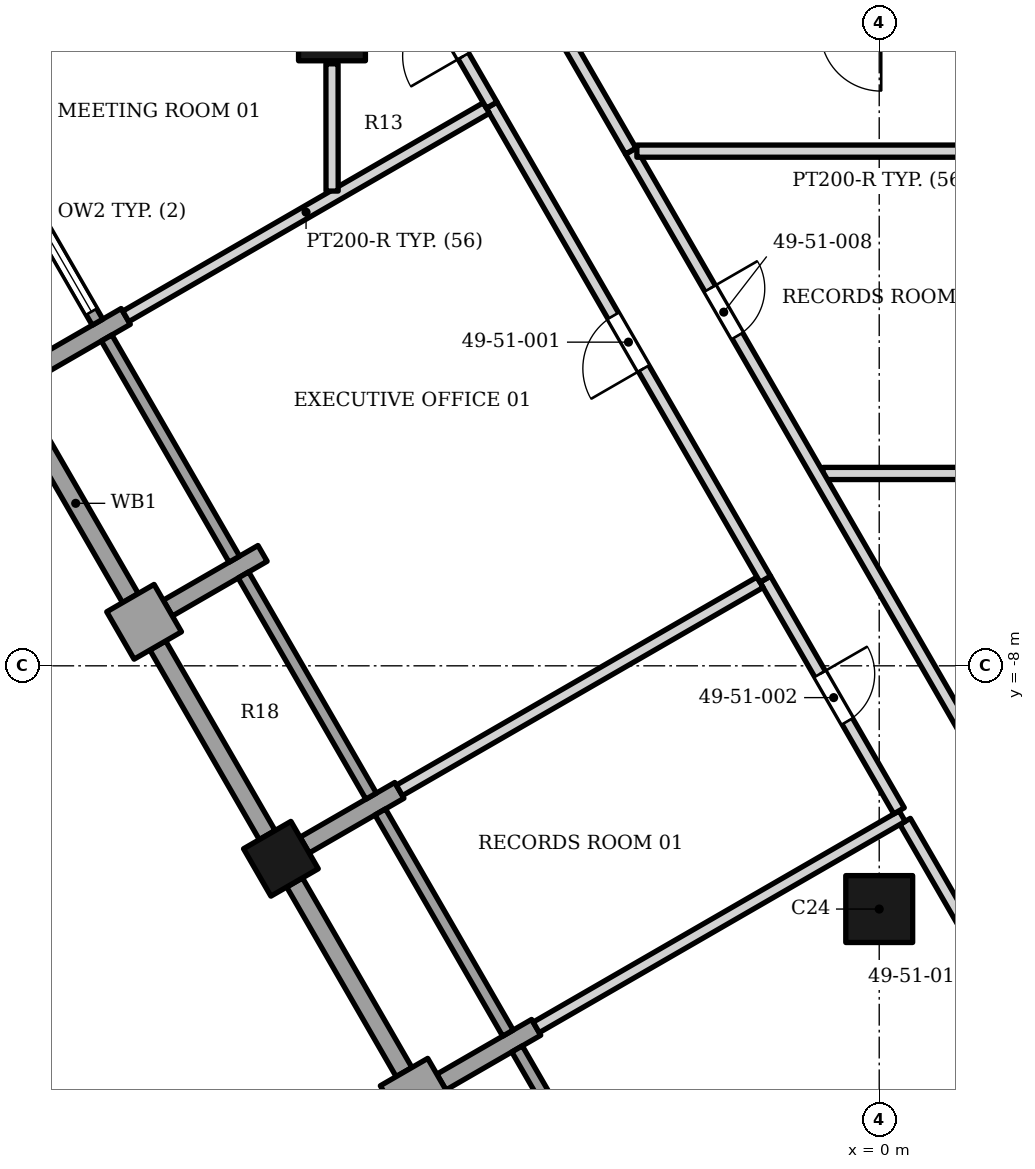
"""IFC4 building model, lengths in metres.
Left out: names, types, materials, properties, quantities, classifications, styles, units other than length and angle.
Written with IfcOpenShell. Run it as: python <this file> out.ifc"""

import sys

from ifc_helpers import new_model, si_unit, direction, frame, frame_2d, origin, origin_2d, place, context, subcontext, project, spatial, rectangle, extrude, element, fill, save


model = new_model("IFC4")
c1 = context("Model", 3, precision=1e-05, world=origin(), true_north=direction((0.0, 1.0)))
c2 = subcontext(c1, "Body", "Model", "MODEL_VIEW")
j1 = project(units=[si_unit("LENGTHUNIT", "METRE"), si_unit("PLANEANGLEUNIT", "RADIAN")], contexts=[c1])
p1 = place(None, origin())
s1 = spatial("IfcSite", under=j1, at=p1, CompositionType="ELEMENT")
p2 = place(p1, origin())
s2 = spatial("IfcBuilding", under=s1, at=p2, CompositionType="ELEMENT")
p3 = place(p2, frame((0.0, 0.0, 208.1)))
s3 = spatial("IfcBuildingStorey", under=s2, at=p3, CompositionType="ELEMENT", Elevation=208.1)
for number, where, z_axis, x_axis in (
    (1, (-9.0, 2.5, 0.0), (0.0, 0.0, 1.0), (1.0, 0.0, 0.0)),
    (2, (0.0, -12.0, 0.0), (0.0, 0.0, 1.0), (1.0, 0.0, 0.0)),
):
    element("IfcColumn", number, at=place(p3, frame(where, z_axis=z_axis, x_axis=x_axis)), inside=s3, PredefinedType="COLUMN", context=c2, shape_type="SweptSolid", body=[
        extrude(rectangle(XDim=1.1, YDim=1.1, at=origin_2d()), origin(), (0.0, 0.0, 1.0), 3.9),
    ])
p4 = place(p3, frame((-9.84, -11.173, 0.0), z_axis=(0.0, 0.0, 1.0), x_axis=(0.499999984885, -0.866025412511, 0.0)))
e3 = element("IfcColumn", 3, at=p4, inside=s3, PredefinedType="COLUMN", context=c2, shape_type="SweptSolid", body=[
    extrude(rectangle(XDim=0.9, YDim=0.9, at=origin_2d()), origin(), (0.0, 0.0, 1.0), 3.9),
])
p5 = place(p3, frame((-12.392, -2.254, 0.0), z_axis=(0.0, 0.0, 1.0), x_axis=(-0.865955154139, -0.50012165622, 0.0)))
e4 = element("IfcWall", 4, at=p5, inside=s3, PredefinedType="SOLIDWALL", context=c2, shape_type="SweptSolid", body=[
    extrude(rectangle(XDim=1.8, YDim=0.3, at=frame_2d((0.9, 0.0))), origin(), (0.0, 0.0, 1.0), 3.0),
])
p6 = place(p3, frame((-12.48, -7.501, 0.0), z_axis=(0.0, 0.0, 1.0), x_axis=(0.865896406789, 0.500223362819, 0.0)))
e5 = element("IfcWall", 5, at=p6, inside=s3, PredefinedType="SOLIDWALL", context=c2, shape_type="SweptSolid", body=[
    extrude(rectangle(XDim=0.9, YDim=0.9, at=frame_2d((0.45, 0.0))), origin(), (0.0, 0.0, 1.0), 3.0),
])
p7 = place(p3, frame((-10.142, -6.151, 0.0), z_axis=(0.0, 0.0, 1.0), x_axis=(-0.866047807691, -0.499961193289, 0.0)))
e6 = element("IfcWall", 6, at=p7, inside=s3, PredefinedType="SOLIDWALL", context=c2, shape_type="SweptSolid", body=[
    extrude(rectangle(XDim=1.8, YDim=0.3, at=frame_2d((0.9, 0.0))), origin(), (0.0, 0.0, 1.0), 3.0),
])
p8 = place(p3, frame((-7.892, -10.048, 0.0), z_axis=(0.0, 0.0, 1.0), x_axis=(-0.866013897511, -0.50001992892, 0.0)))
e7 = element("IfcWall", 7, at=p8, inside=s3, PredefinedType="SOLIDWALL", context=c2, shape_type="SweptSolid", body=[
    extrude(rectangle(XDim=1.8, YDim=0.3, at=frame_2d((0.9, 0.0))), origin(), (0.0, 0.0, 1.0), 3.0),
])
p9 = place(p3, frame((-7.98, -15.295, 0.0), z_axis=(0.0, 0.0, 1.0), x_axis=(0.866013897511, 0.50001992892, 0.0)))
e8 = element("IfcWall", 8, at=p9, inside=s3, PredefinedType="SOLIDWALL", context=c2, shape_type="SweptSolid", body=[
    extrude(rectangle(XDim=0.9, YDim=0.9, at=frame_2d((0.45, 0.0))), origin(), (0.0, 0.0, 1.0), 3.0),
])
p10 = place(p3, frame((-7.2, -14.845, 0.0), z_axis=(0.0, 0.0, 1.0), x_axis=(0.865989075817, 0.500062916607, 0.0)))
e9 = element("IfcWall", 9, at=p10, inside=s3, PredefinedType="SOLIDWALL", context=c2, shape_type="SweptSolid", body=[
    extrude(rectangle(XDim=1.8, YDim=0.3, at=frame_2d((0.9, 0.0))), origin(), (0.0, 0.0, 1.0), 3.0),
])
p11 = place(p3, frame((-14.956, 1.288, 0.0), z_axis=(0.0, 0.0, 1.0), x_axis=(0.500027713859, -0.866009402589, 0.0)))
e10 = element("IfcWall", 10, at=p11, inside=s3, PredefinedType="ELEMENTEDWALL", context=c2, shape_type="SweptSolid", body=[
    extrude(rectangle(XDim=4.2, YDim=0.2, at=frame_2d((2.1, 0.0))), origin(), (0.0, 0.0, 1.0), 3.0),
])
p12 = place(p11, frame((0.2, 0.0, 0.45)))
e11 = element("IfcOpeningElement", 11, at=p12, cuts=e10, PredefinedType="OPENING", context=c2, shape_type="SweptSolid", body=[
    extrude(rectangle(XDim=3.8, YDim=2.25, at=frame_2d((1.9, 1.125))), frame((0.0, 0.11, 0.0), z_axis=(0.0, -1.0, 0.0), x_axis=(1.0, 0.0, 0.0)), (0.0, 0.0, 1.0), 0.22),
])
p13 = place(p3, frame((-14.115, -3.769, 0.0), z_axis=(0.0, 0.0, 1.0), x_axis=(0.500012057535, -0.866018442252, 0.0)))
e12 = element("IfcWall", 12, at=p13, inside=s3, PredefinedType="SOLIDWALL", context=c2, shape_type="SweptSolid", body=[
    extrude(rectangle(XDim=3.6, YDim=0.3, at=frame_2d((1.8, 0.0))), origin(), (0.0, 0.0, 1.0), 3.0),
])
p14 = place(p3, frame((-12.706, -2.609, 0.0), z_axis=(0.0, 0.0, 1.0), x_axis=(0.500002543286, -0.866023935413, 0.0)))
e13 = element("IfcWall", 13, at=p14, inside=s3, PredefinedType="ELEMENTEDWALL", context=c2, shape_type="SweptSolid", body=[
    extrude(rectangle(XDim=4.2, YDim=0.2, at=frame_2d((2.1, 0.0))), origin(), (0.0, 0.0, 1.0), 3.0),
])
p15 = place(p3, frame((-11.865, -7.666, 0.0), z_axis=(0.0, 0.0, 1.0), x_axis=(0.500012057535, -0.866018442252, 0.0)))
e14 = element("IfcWall", 14, at=p15, inside=s3, PredefinedType="SOLIDWALL", context=c2, shape_type="SweptSolid", body=[
    extrude(rectangle(XDim=3.6, YDim=0.3, at=frame_2d((1.8, 0.0))), origin(), (0.0, 0.0, 1.0), 3.0),
])
p16 = place(p3, frame((-10.456, -6.506, 0.0), z_axis=(0.0, 0.0, 1.0), x_axis=(0.500027713859, -0.866009402589, 0.0)))
e15 = element("IfcWall", 15, at=p16, inside=s3, PredefinedType="ELEMENTEDWALL", context=c2, shape_type="SweptSolid", body=[
    extrude(rectangle(XDim=4.2, YDim=0.2, at=frame_2d((2.1, 0.0))), origin(), (0.0, 0.0, 1.0), 3.0),
])
p17 = place(p3, frame((-9.615, -11.563, 0.0), z_axis=(0.0, 0.0, 1.0), x_axis=(0.500012057535, -0.866018442252, 0.0)))
e16 = element("IfcWall", 16, at=p17, inside=s3, PredefinedType="SOLIDWALL", context=c2, shape_type="SweptSolid", body=[
    extrude(rectangle(XDim=3.6, YDim=0.3, at=frame_2d((1.8, 0.0))), origin(), (0.0, 0.0, 1.0), 2.95),
])
p18 = place(p3, frame((-8.206, -10.403, 0.0), z_axis=(0.0, 0.0, 1.0), x_axis=(0.500002543286, -0.866023935413, 0.0)))
e17 = element("IfcWall", 17, at=p18, inside=s3, PredefinedType="ELEMENTEDWALL", context=c2, shape_type="SweptSolid", body=[
    extrude(rectangle(XDim=4.2, YDim=0.2, at=frame_2d((2.1, 0.0))), origin(), (0.0, 0.0, 1.0), 2.95),
])
p19 = place(p3, frame((-5.956, -14.3, 0.0), z_axis=(0.0, 0.0, 1.0), x_axis=(0.500027713859, -0.866009402589, 0.0)))
e18 = element("IfcWall", 18, at=p19, inside=s3, PredefinedType="ELEMENTEDWALL", context=c2, shape_type="SweptSolid", body=[
    extrude(rectangle(XDim=4.2, YDim=0.2, at=frame_2d((2.1, 0.0))), origin(), (0.0, 0.0, 1.0), 3.0),
])
p20 = place(p3, frame((0.426, -10.558, 0.0), z_axis=(0.0, 0.0, 1.0), x_axis=(0.500350308999, -0.865823058301, 0.0)))
e19 = element("IfcWall", 19, at=p20, inside=s3, PredefinedType="PARTITIONING", context=c2, shape_type="SweptSolid", body=[
    extrude(rectangle(XDim=4.083, YDim=0.2, at=frame_2d((2.042, 0.0))), origin(), (0.0, 0.0, 1.0), 2.95),
])
p21 = place(p20, frame((1.842, 0.0, 0.0)))
e20 = element("IfcOpeningElement", 20, at=p21, cuts=e19, PredefinedType="OPENING", context=c2, shape_type="SweptSolid", body=[
    extrude(rectangle(XDim=1.1, YDim=2.1, at=frame_2d((0.55, 1.05))), frame((0.0, 0.11, 0.0), z_axis=(0.0, -1.0, 0.0), x_axis=(1.0, 0.0, 0.0)), (0.0, 0.0, 1.0), 0.22),
])
p22 = place(p3, frame((-5.641, -13.946, 0.0), z_axis=(0.0, 0.0, 1.0), x_axis=(0.866131772529, 0.499815718657, 0.0)))
e21 = element("IfcWall", 21, at=p22, inside=s3, PredefinedType="PARTITIONING", context=c2, shape_type="SweptSolid", body=[
    extrude(rectangle(XDim=6.949, YDim=0.2, at=frame_2d((3.475, 0.0))), origin(), (0.0, 0.0, 1.0), 2.884),
])
p23 = place(p3, frame((-1.873, -6.576, 0.0), z_axis=(0.0, 0.0, 1.0), x_axis=(0.499989943423, -0.866031209874, 0.0)))
e22 = element("IfcWall", 22, at=p23, inside=s3, PredefinedType="PARTITIONING", context=c2, shape_type="SweptSolid", body=[
    extrude(rectangle(XDim=4.398, YDim=0.2, at=frame_2d((2.199, 0.0))), origin(), (0.0, 0.0, 1.0), 2.884),
])
p24 = place(p23, frame((1.798, 0.0, 0.0)))
e23 = element("IfcOpeningElement", 23, at=p24, cuts=e22, PredefinedType="OPENING", context=c2, shape_type="SweptSolid", body=[
    extrude(rectangle(XDim=0.9, YDim=2.1, at=frame_2d((0.45, 1.05))), frame((0.0, 0.11, 0.0), z_axis=(0.0, -1.0, 0.0), x_axis=(1.0, 0.0, 0.0)), (0.0, 0.0, 1.0), 0.22),
])
p25 = place(p3, frame((-7.891, -10.048, 0.0), z_axis=(0.0, 0.0, 1.0), x_axis=(0.866160062832, 0.499766691121, 0.0)))
e24 = element("IfcWall", 24, at=p25, inside=s3, PredefinedType="PARTITIONING", context=c2, shape_type="SweptSolid", body=[
    extrude(rectangle(XDim=6.848, YDim=0.2, at=frame_2d((3.424, 0.0))), origin(), (0.0, 0.0, 1.0), 2.884),
])
p26 = place(p3, frame((-6.374, 1.22, 0.0), z_axis=(0.0, 0.0, 1.0), x_axis=(0.5000018851, -0.866024315419, 0.0)))
e25 = element("IfcWall", 25, at=p26, inside=s3, PredefinedType="PARTITIONING", context=c2, shape_type="SweptSolid", body=[
    extrude(rectangle(XDim=9.0, YDim=0.2, at=frame_2d((4.5, 0.0))), origin(), (0.0, 0.0, 1.0), 2.884),
])
p27 = place(p26, frame((4.0, 0.0, 0.0)))
e26 = element("IfcOpeningElement", 26, at=p27, cuts=e25, PredefinedType="OPENING", context=c2, shape_type="SweptSolid", body=[
    extrude(rectangle(XDim=1.0, YDim=2.4, at=frame_2d((0.5, 1.2))), frame((0.0, 0.11, 0.0), z_axis=(0.0, -1.0, 0.0), x_axis=(1.0, 0.0, 0.0)), (0.0, 0.0, 1.0), 0.22),
])
p28 = place(p3, frame((-0.925, -4.837, 0.0), z_axis=(0.0, 0.0, 1.0), x_axis=(0.999999933905, 0.000363579678, 0.0)))
e27 = element("IfcWall", 27, at=p28, inside=s3, PredefinedType="PARTITIONING", context=c2, shape_type="SweptSolid", body=[
    extrude(rectangle(XDim=4.7, YDim=0.2, at=frame_2d((2.35, 0.0))), origin(), (0.0, 0.0, 1.0), 3.73),
])
p29 = place(p3, frame((-12.392, -2.254, 0.0), z_axis=(0.0, 0.0, 1.0), x_axis=(0.86583110311, 0.50033638773, 0.0)))
e28 = element("IfcWall", 28, at=p29, inside=s3, PredefinedType="PARTITIONING", context=c2, shape_type="SweptSolid", body=[
    extrude(rectangle(XDim=6.849, YDim=0.2, at=frame_2d((3.425, 0.0))), origin(), (0.0, 0.0, 1.0), 3.052),
])
p30 = place(p3, frame((-4.086, 0.464, 0.0), z_axis=(0.0, 0.0, 1.0), x_axis=(0.499999074482, -0.866025938132, 0.0)))
e29 = element("IfcWall", 29, at=p30, inside=s3, PredefinedType="PARTITIONING", context=c2, shape_type="SweptSolid", body=[
    extrude(rectangle(XDim=13.013, YDim=0.2, at=frame_2d((6.507, 0.0))), origin(), (0.0, 0.0, 1.0), 2.884),
])
p31 = place(p30, frame((2.607, 0.0, 0.0)))
e30 = element("IfcOpeningElement", 30, at=p31, cuts=e29, PredefinedType="OPENING", context=c2, shape_type="SweptSolid", body=[
    extrude(rectangle(XDim=0.9, YDim=2.1, at=frame_2d((0.45, 1.05))), frame((0.0, 0.11, 0.0), z_axis=(0.0, -1.0, 0.0), x_axis=(1.0, 0.0, 0.0)), (0.0, 0.0, 1.0), 0.22),
])
p32 = place(p3, frame((-3.986, 0.464, 0.0), z_axis=(0.0, 0.0, 1.0), x_axis=(1.0, 0.0, 0.0)))
e31 = element("IfcWall", 31, at=p32, inside=s3, PredefinedType="PARTITIONING", context=c2, shape_type="SweptSolid", body=[
    extrude(rectangle(XDim=6.452, YDim=0.2, at=frame_2d((3.226, 0.0))), origin(), (0.0, 0.0, 1.0), 2.884),
])
p33 = place(p3, frame((-7.804, 3.699, 0.0), z_axis=(0.0, 0.0, 1.0), x_axis=(0.500020309772, -0.866013677614, 0.0)))
e32 = element("IfcWall", 32, at=p33, inside=s3, PredefinedType="PARTITIONING", context=c2, shape_type="SweptSolid", body=[
    extrude(rectangle(XDim=2.862, YDim=0.2, at=frame_2d((1.431, 0.0))), origin(), (0.0, 0.0, 1.0), 3.73),
])
p34 = place(p33, frame((0.932, 0.0, 0.0)))
e33 = element("IfcOpeningElement", 33, at=p34, cuts=e32, PredefinedType="OPENING", context=c2, shape_type="SweptSolid", body=[
    extrude(rectangle(XDim=1.0, YDim=2.1, at=frame_2d((0.5, 1.05))), frame((0.0, 0.11, 0.0), z_axis=(0.0, -1.0, 0.0), x_axis=(1.0, 0.0, 0.0)), (0.0, 0.0, 1.0), 0.22),
])
p35 = place(p3, frame((-9.0, 1.9, 0.0), z_axis=(0.0, 0.0, 1.0), x_axis=(0.000816802528, -0.999999666417, 0.0)))
e34 = element("IfcWall", 34, at=p35, inside=s3, PredefinedType="PARTITIONING", context=c2, shape_type="SweptSolid", body=[
    extrude(rectangle(XDim=2.092, YDim=0.2, at=frame_2d((1.046, 0.0))), origin(), (0.0, 0.0, 1.0), 3.052),
])
p36 = place(p3, frame((-5.963, 3.712, 0.0), z_axis=(0.0, 0.0, 1.0), x_axis=(0.500417539209, -0.865784203166, 0.0)))
e35 = element("IfcWall", 35, at=p36, inside=s3, PredefinedType="PARTITIONING", context=c2, shape_type="SweptSolid", body=[
    extrude(rectangle(XDim=3.749, YDim=0.2, at=frame_2d((1.875, 0.0))), origin(), (0.0, 0.0, 1.0), 2.884),
])
p37 = place(p12, origin())
e36 = element("IfcWindow", 36, at=p37, inside=s3, PartitioningType="SINGLE_PANEL", PredefinedType="WINDOW", context=c2, shape_type="SweptSolid", body=[
    extrude(rectangle(XDim=3.8, YDim=2.25, at=frame_2d((1.9, 1.125))), frame((0.0, 0.03, 0.0), z_axis=(0.0, -1.0, 0.0), x_axis=(1.0, 0.0, 0.0)), (0.0, 0.0, 1.0), 0.06),
])
fill(e11, e36)
p38 = place(p27, origin())
e37 = element("IfcDoor", 37, at=p38, inside=s3, OperationType="SINGLE_SWING_RIGHT", PredefinedType="DOOR", context=c2, shape_type="SweptSolid", body=[
    extrude(rectangle(XDim=1.0, YDim=2.4, at=frame_2d((0.5, 1.2))), frame((0.0, 0.025, 0.0), z_axis=(0.0, -1.0, 0.0), x_axis=(1.0, 0.0, 0.0)), (0.0, 0.0, 1.0), 0.05),
])
fill(e26, e37)
p39 = place(p24, origin())
e38 = element("IfcDoor", 38, at=p39, inside=s3, OperationType="SINGLE_SWING_LEFT", PredefinedType="DOOR", context=c2, shape_type="SweptSolid", body=[
    extrude(rectangle(XDim=0.9, YDim=2.1, at=frame_2d((0.45, 1.05))), frame((0.0, 0.025, 0.0), z_axis=(0.0, -1.0, 0.0), x_axis=(1.0, 0.0, 0.0)), (0.0, 0.0, 1.0), 0.05),
])
fill(e23, e38)
p40 = place(p31, origin())
e39 = element("IfcDoor", 39, at=p40, inside=s3, OperationType="SINGLE_SWING_LEFT", PredefinedType="DOOR", context=c2, shape_type="SweptSolid", body=[
    extrude(rectangle(XDim=0.9, YDim=2.1, at=frame_2d((0.45, 1.05))), frame((0.0, 0.025, 0.0), z_axis=(0.0, -1.0, 0.0), x_axis=(1.0, 0.0, 0.0)), (0.0, 0.0, 1.0), 0.05),
])
fill(e30, e39)
p41 = place(p34, origin())
e40 = element("IfcDoor", 40, at=p41, inside=s3, OperationType="SINGLE_SWING_RIGHT", PredefinedType="DOOR", context=c2, shape_type="SweptSolid", body=[
    extrude(rectangle(XDim=1.0, YDim=2.1, at=frame_2d((0.5, 1.05))), frame((0.0, 0.025, 0.0), z_axis=(0.0, -1.0, 0.0), x_axis=(1.0, 0.0, 0.0)), (0.0, 0.0, 1.0), 0.05),
])
fill(e33, e40)
save(model, sys.argv[1])
